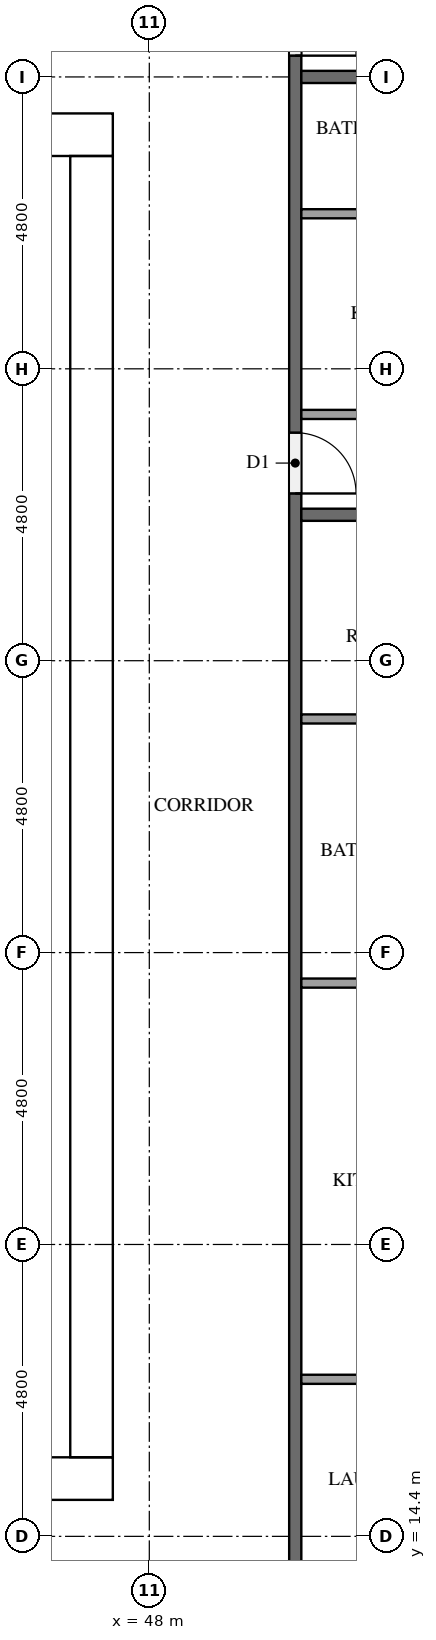
"""IFC4 building model, lengths in metres.
Left out: names, types, materials, properties, quantities, classifications, styles, units other than length and angle.
Written with IfcOpenShell. Run it as: python <this file> out.ifc"""

import sys

from ifc_helpers import new_model, si_unit, direction, frame, frame_2d, origin, place, context, subcontext, project, spatial, rectangle, extrude, element, fill, save


model = new_model("IFC4")
c1 = context("Model", 3, precision=1e-05, world=origin(), true_north=direction((0.0, 1.0)))
c2 = subcontext(c1, "Body", "Model", "MODEL_VIEW")
j1 = project(units=[si_unit("LENGTHUNIT", "METRE"), si_unit("PLANEANGLEUNIT", "RADIAN")], contexts=[c1])
p1 = place(None, origin())
s1 = spatial("IfcSite", under=j1, at=p1, CompositionType="ELEMENT")
p2 = place(p1, origin())
s2 = spatial("IfcBuilding", under=s1, at=p2, CompositionType="ELEMENT")
p3 = place(p2, frame((0.0, 0.0, 182.4)))
s3 = spatial("IfcBuildingStorey", under=s2, at=p3, CompositionType="ELEMENT", Elevation=182.4)
p4 = place(p3, frame((15.0, 15.35, 0.0), z_axis=(0.0, 0.0, 1.0), x_axis=(1.0, 0.0, 0.0)))
e1 = element("IfcWall", 1, at=p4, inside=s3, PredefinedType="SHEAR", context=c2, shape_type="SweptSolid", body=[
    extrude(rectangle(XDim=32.4, YDim=0.7, at=frame_2d((16.2, 0.0))), origin(), (0.0, 0.0, 1.0), 3.2),
])
p5 = place(p4, frame((15.3, 0.0, 0.0)))
e2 = element("IfcOpeningElement", 2, at=p5, cuts=e1, PredefinedType="OPENING", context=c2, shape_type="SweptSolid", body=[
    extrude(rectangle(XDim=1.8, YDim=2.1, at=frame_2d((0.9, 1.05))), frame((0.0, 0.36, 0.0), z_axis=(0.0, -1.0, 0.0), x_axis=(1.0, 0.0, 0.0)), (0.0, 0.0, 1.0), 0.72),
])
p6 = place(p3, frame((15.0, 37.45, 0.0), z_axis=(0.0, 0.0, 1.0), x_axis=(1.0, 0.0, 0.0)))
e3 = element("IfcWall", 3, at=p6, inside=s3, PredefinedType="SHEAR", context=c2, shape_type="SweptSolid", body=[
    extrude(rectangle(XDim=32.4, YDim=0.7, at=frame_2d((16.2, 0.0))), origin(), (0.0, 0.0, 1.0), 3.2),
])
p7 = place(p6, frame((15.3, 0.0, 0.0)))
e4 = element("IfcOpeningElement", 4, at=p7, cuts=e3, PredefinedType="OPENING", context=c2, shape_type="SweptSolid", body=[
    extrude(rectangle(XDim=1.8, YDim=2.1, at=frame_2d((0.9, 1.05))), frame((0.0, 0.36, 0.0), z_axis=(0.0, -1.0, 0.0), x_axis=(1.0, 0.0, 0.0)), (0.0, 0.0, 1.0), 0.72),
])
p8 = place(p6, frame((1.544, 0.0, 0.0)))
e5 = element("IfcOpeningElement", 5, at=p8, cuts=e3, PredefinedType="OPENING", context=c2, shape_type="SweptSolid", body=[
    extrude(rectangle(XDim=1.0, YDim=2.1, at=frame_2d((0.5, 1.05))), frame((0.0, 0.36, 0.0), z_axis=(0.0, -1.0, 0.0), x_axis=(1.0, 0.0, 0.0)), (0.0, 0.0, 1.0), 0.72),
])
p9 = place(p6, frame((5.219, 0.0, 0.0)))
e6 = element("IfcOpeningElement", 6, at=p9, cuts=e3, PredefinedType="OPENING", context=c2, shape_type="SweptSolid", body=[
    extrude(rectangle(XDim=1.0, YDim=2.1, at=frame_2d((0.5, 1.05))), frame((0.0, 0.36, 0.0), z_axis=(0.0, -1.0, 0.0), x_axis=(1.0, 0.0, 0.0)), (0.0, 0.0, 1.0), 0.72),
])
p10 = place(p3, frame((47.05, 15.7, 0.0), z_axis=(0.0, 0.0, 1.0), x_axis=(0.0, 1.0, 0.0)))
e7 = element("IfcWall", 7, at=p10, inside=s3, PredefinedType="SHEAR", context=c2, shape_type="SweptSolid", body=[
    extrude(rectangle(XDim=21.4, YDim=0.7, at=frame_2d((10.7, 0.0))), origin(), (0.0, 0.0, 1.0), 3.2),
])
p11 = place(p10, frame((10.4, 0.0, 0.0)))
e8 = element("IfcOpeningElement", 8, at=p11, cuts=e7, PredefinedType="OPENING", context=c2, shape_type="SweptSolid", body=[
    extrude(rectangle(XDim=1.2, YDim=2.1, at=frame_2d((0.6, 1.05))), frame((0.0, 0.36, 0.0), z_axis=(0.0, -1.0, 0.0), x_axis=(1.0, 0.0, 0.0)), (0.0, 0.0, 1.0), 0.72),
])
p12 = place(p3, frame((50.4, 40.7, 0.0), z_axis=(0.0, 0.0, 1.0), x_axis=(0.0, -1.0, 0.0)))
e9 = element("IfcWall", 9, at=p12, inside=s3, PredefinedType="PARTITIONING", context=c2, shape_type="SweptSolid", body=[
    extrude(rectangle(XDim=28.6, YDim=0.2, at=frame_2d((14.3, 0.0))), origin(), (0.0, 0.0, 1.0), 3.2),
])
p13 = place(p12, frame((27.3, 0.0, 0.0)))
e10 = element("IfcOpeningElement", 10, at=p13, cuts=e9, PredefinedType="OPENING", context=c2, shape_type="SweptSolid", body=[
    extrude(rectangle(XDim=1.1, YDim=2.1, at=frame_2d((0.55, 1.05))), frame((0.0, 0.11, 0.0), z_axis=(0.0, -1.0, 0.0), x_axis=(1.0, 0.0, 0.0)), (0.0, 0.0, 1.0), 0.22),
])
p14 = place(p12, frame((8.15, 0.0, 0.0)))
e11 = element("IfcOpeningElement", 11, at=p14, cuts=e9, PredefinedType="OPENING", context=c2, shape_type="SweptSolid", body=[
    extrude(rectangle(XDim=1.0, YDim=2.1, at=frame_2d((0.5, 1.05))), frame((0.0, 0.11, 0.0), z_axis=(0.0, -1.0, 0.0), x_axis=(1.0, 0.0, 0.0)), (0.0, 0.0, 1.0), 0.22),
])
p15 = place(p12, frame((0.95, 0.0, 0.0)))
e12 = element("IfcOpeningElement", 12, at=p15, cuts=e9, PredefinedType="OPENING", context=c2, shape_type="SweptSolid", body=[
    extrude(rectangle(XDim=1.0, YDim=2.1, at=frame_2d((0.5, 1.05))), frame((0.0, 0.11, 0.0), z_axis=(0.0, -1.0, 0.0), x_axis=(1.0, 0.0, 0.0)), (0.0, 0.0, 1.0), 0.22),
])
for number, where, z_axis, x_axis in (
    (13, (50.5, 31.2, 0.0), (0.0, 0.0, 1.0), (1.0, 0.0, 0.0)),
    (14, (50.5, 38.4, 0.0), (0.0, 0.0, 1.0), (1.0, 0.0, 0.0)),
):
    element("IfcWall", number, at=place(p3, frame(where, z_axis=z_axis, x_axis=x_axis)), inside=s3, PredefinedType="PARTITIONING", context=c2, shape_type="SweptSolid", body=[
        extrude(rectangle(XDim=11.8, YDim=0.2, at=frame_2d((5.9, 0.0))), origin(), (0.0, 0.0, 1.0), 3.2),
    ])
for number, where, z_axis, x_axis in (
    (15, (50.5, 16.983, 0.0), (0.0, 0.0, 1.0), (1.0, 0.0, 0.0)),
    (16, (50.5, 23.498, 0.0), (0.0, 0.0, 1.0), (1.0, 0.0, 0.0)),
    (17, (50.5, 27.842, 0.0), (0.0, 0.0, 1.0), (1.0, 0.0, 0.0)),
):
    element("IfcWall", number, at=place(p3, frame(where, z_axis=z_axis, x_axis=x_axis)), inside=s3, PredefinedType="PARTITIONING", context=c2, shape_type="SweptSolid", body=[
        extrude(rectangle(XDim=3.125, YDim=0.15, at=frame_2d((1.562, 0.0))), origin(), (0.0, 0.0, 1.0), 3.2),
    ])
p16 = place(p3, frame((50.5, 36.15, 0.0), z_axis=(0.0, 0.0, 1.0), x_axis=(1.0, 0.0, 0.0)))
e18 = element("IfcWall", 18, at=p16, inside=s3, PredefinedType="PARTITIONING", context=c2, shape_type="SweptSolid", body=[
    extrude(rectangle(XDim=3.725, YDim=0.15, at=frame_2d((1.863, 0.0))), origin(), (0.0, 0.0, 1.0), 3.2),
])
p17 = place(p3, frame((50.5, 32.85, 0.0), z_axis=(0.0, 0.0, 1.0), x_axis=(1.0, 0.0, 0.0)))
e19 = element("IfcWall", 19, at=p17, inside=s3, PredefinedType="PARTITIONING", context=c2, shape_type="SweptSolid", body=[
    extrude(rectangle(XDim=3.875, YDim=0.15, at=frame_2d((1.938, 0.0))), origin(), (0.0, 0.0, 1.0), 3.2),
])
p18 = place(p11, origin())
e20 = element("IfcDoor", 20, at=p18, inside=s3, OperationType="SINGLE_SWING_LEFT", PredefinedType="DOOR", context=c2, shape_type="SweptSolid", body=[
    extrude(rectangle(XDim=1.2, YDim=2.1, at=frame_2d((0.6, 1.05))), frame((0.0, 0.025, 0.0), z_axis=(0.0, -1.0, 0.0), x_axis=(1.0, 0.0, 0.0)), (0.0, 0.0, 1.0), 0.05),
])
fill(e8, e20)
p19 = place(p14, origin())
e21 = element("IfcDoor", 21, at=p19, inside=s3, OperationType="SINGLE_SWING_RIGHT", PredefinedType="DOOR", context=c2, shape_type="SweptSolid", body=[
    extrude(rectangle(XDim=1.0, YDim=2.1, at=frame_2d((0.5, 1.05))), frame((0.0, 0.025, 0.0), z_axis=(0.0, -1.0, 0.0), x_axis=(1.0, 0.0, 0.0)), (0.0, 0.0, 1.0), 0.05),
])
fill(e11, e21)
p20 = place(p15, origin())
e22 = element("IfcDoor", 22, at=p20, inside=s3, OperationType="SINGLE_SWING_RIGHT", PredefinedType="DOOR", context=c2, shape_type="SweptSolid", body=[
    extrude(rectangle(XDim=1.0, YDim=2.1, at=frame_2d((0.5, 1.05))), frame((0.0, 0.025, 0.0), z_axis=(0.0, -1.0, 0.0), x_axis=(1.0, 0.0, 0.0)), (0.0, 0.0, 1.0), 0.05),
])
fill(e12, e22)
save(model, sys.argv[1])
